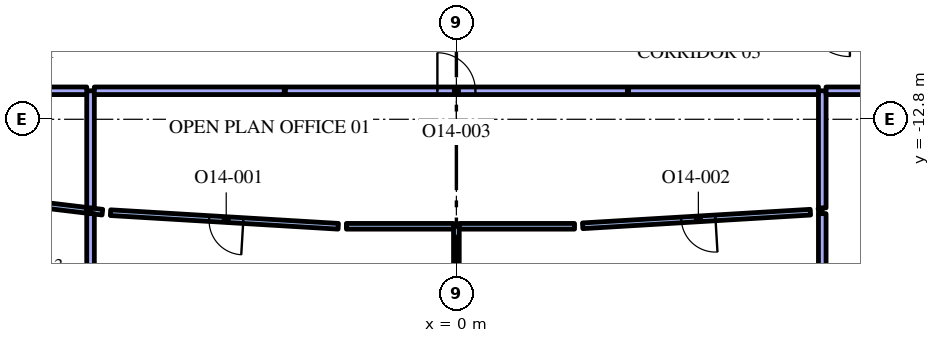
"""IFC4 building model, lengths in metres.
Left out: names, types, materials, properties, quantities, classifications, styles, units other than length and angle.
Written with IfcOpenShell. Run it as: python <this file> out.ifc"""

import sys

from ifc_helpers import new_model, si_unit, direction, frame, frame_2d, origin, place, context, subcontext, project, spatial, rectangle, extrude, element, fill, save


model = new_model("IFC4")
c1 = context("Model", 3, precision=1e-05, world=origin(), true_north=direction((0.0, 1.0)))
c2 = subcontext(c1, "Body", "Model", "MODEL_VIEW")
j1 = project(units=[si_unit("LENGTHUNIT", "METRE"), si_unit("PLANEANGLEUNIT", "RADIAN")], contexts=[c1])
p1 = place(None, origin())
s1 = spatial("IfcSite", under=j1, at=p1, CompositionType="ELEMENT")
p2 = place(p1, origin())
s2 = spatial("IfcBuilding", under=s1, at=p2, CompositionType="ELEMENT")
p3 = place(p2, frame((0.0, 0.0, 304.8)))
s3 = spatial("IfcBuildingStorey", under=s2, at=p3, CompositionType="ELEMENT", Elevation=304.8)
p4 = place(p3, frame((0.0, -15.615, 0.0), z_axis=(0.0, 0.0, 1.0), x_axis=(0.0, -1.0, 0.0)))
e1 = element("IfcWall", 1, at=p4, inside=s3, PredefinedType="PARTITIONING", context=c2, shape_type="SweptSolid", body=[
    extrude(rectangle(XDim=3.2, YDim=0.15, at=frame_2d((1.6, 0.0))), origin(), (0.0, 0.0, 1.0), 3.55),
])
p5 = place(p3, frame((-9.627, -15.207, 0.0), z_axis=(0.0, 0.0, 1.0), x_axis=(0.992909886905, -0.118869493503, 0.0)))
e2 = element("IfcWall", 2, at=p5, inside=s3, PredefinedType="PARTITIONING", context=c2, shape_type="SweptSolid", body=[
    extrude(rectangle(XDim=0.314, YDim=0.15, at=frame_2d((0.157, 0.0))), origin(), (0.0, 0.0, 1.0), 3.55),
])
p6 = place(p3, frame((-3.109, -15.615, 0.0), z_axis=(0.0, 0.0, 1.0), x_axis=(-0.998221243398, 0.059618363188, 0.0)))
e3 = element("IfcWall", 3, at=p6, inside=s3, PredefinedType="PARTITIONING", context=c2, shape_type="SweptSolid", body=[
    extrude(rectangle(XDim=6.003, YDim=0.15, at=frame_2d((3.002, 0.0))), origin(), (0.0, 0.0, 1.0), 3.55),
])
p7 = place(p6, frame((2.503, 0.0, 0.0)))
e4 = element("IfcOpeningElement", 4, at=p7, cuts=e3, PredefinedType="OPENING", context=c2, shape_type="SweptSolid", body=[
    extrude(rectangle(XDim=0.9, YDim=2.1, at=frame_2d((0.45, 1.05))), frame((0.0, 0.085, 0.0), z_axis=(0.0, -1.0, 0.0), x_axis=(1.0, 0.0, 0.0)), (0.0, 0.0, 1.0), 0.17),
])
p8 = place(p3, frame((-2.895, -15.615, 0.0), z_axis=(0.0, 0.0, 1.0), x_axis=(1.0, 0.0, 0.0)))
e5 = element("IfcWall", 5, at=p8, inside=s3, PredefinedType="PARTITIONING", context=c2, shape_type="SweptSolid", body=[
    extrude(rectangle(XDim=2.82, YDim=0.15, at=frame_2d((1.41, 0.0))), origin(), (0.0, 0.0, 1.0), 3.55),
])
p9 = place(p3, frame((-9.627, -17.919, 0.0), z_axis=(0.0, 0.0, 1.0), x_axis=(0.0, 1.0, 0.0)))
e6 = element("IfcWall", 6, at=p9, inside=s3, PredefinedType="PARTITIONING", context=c2, shape_type="SweptSolid", body=[
    extrude(rectangle(XDim=2.636, YDim=0.2, at=frame_2d((1.318, 0.0))), origin(), (0.0, 0.0, 1.0), 3.55),
])
p10 = place(p3, frame((0.075, -15.615, 0.0), z_axis=(0.0, 0.0, 1.0), x_axis=(1.0, 0.0, 0.0)))
e7 = element("IfcWall", 7, at=p10, inside=s3, PredefinedType="PARTITIONING", context=c2, shape_type="SweptSolid", body=[
    extrude(rectangle(XDim=3.034, YDim=0.15, at=frame_2d((1.517, 0.0))), origin(), (0.0, 0.0, 1.0), 3.55),
])
p11 = place(p3, frame((9.315, -15.244, 0.0), z_axis=(0.0, 0.0, 1.0), x_axis=(-0.998218822372, -0.059658885864, 0.0)))
e8 = element("IfcWall", 8, at=p11, inside=s3, PredefinedType="PARTITIONING", context=c2, shape_type="SweptSolid", body=[
    extrude(rectangle(XDim=6.003, YDim=0.15, at=frame_2d((3.002, 0.0))), origin(), (0.0, 0.0, 1.0), 3.55),
])
p12 = place(p11, frame((2.503, 0.0, 0.0)))
e9 = element("IfcOpeningElement", 9, at=p12, cuts=e8, PredefinedType="OPENING", context=c2, shape_type="SweptSolid", body=[
    extrude(rectangle(XDim=0.9, YDim=2.1, at=frame_2d((0.45, 1.05))), frame((0.0, 0.085, 0.0), z_axis=(0.0, -1.0, 0.0), x_axis=(1.0, 0.0, 0.0)), (0.0, 0.0, 1.0), 0.17),
])
p13 = place(p3, frame((9.528, -15.219, 0.0), z_axis=(0.0, 0.0, 1.0), x_axis=(0.992830592569, 0.119529973061, 0.0)))
e10 = element("IfcWall", 10, at=p13, inside=s3, PredefinedType="PARTITIONING", context=c2, shape_type="SweptSolid", body=[
    extrude(rectangle(XDim=0.1, YDim=0.15, at=frame_2d((0.05, 0.0))), origin(), (0.0, 0.0, 1.0), 3.55),
])
p14 = place(p3, frame((9.627, -15.283, 0.0), z_axis=(0.0, 0.0, 1.0), x_axis=(0.0, -1.0, 0.0)))
e11 = element("IfcWall", 11, at=p14, inside=s3, PredefinedType="PARTITIONING", context=c2, shape_type="SweptSolid", body=[
    extrude(rectangle(XDim=2.636, YDim=0.2, at=frame_2d((1.318, 0.0))), origin(), (0.0, 0.0, 1.0), 3.55),
])
for number, where, z_axis, x_axis in (
    (12, (9.627, -12.05, 0.0), (0.0, 0.0, 1.0), (0.0, -1.0, 0.0)),
    (13, (-9.627, -15.132, 0.0), (0.0, 0.0, 1.0), (0.0, 1.0, 0.0)),
):
    element("IfcWall", number, at=place(p3, frame(where, z_axis=z_axis, x_axis=x_axis)), inside=s3, PredefinedType="PARTITIONING", context=c2, shape_type="SweptSolid", body=[
        extrude(rectangle(XDim=3.082, YDim=0.2, at=frame_2d((1.541, 0.0))), origin(), (0.0, 0.0, 1.0), 3.55),
    ])
p15 = place(p3, frame((-4.5, -12.05, 0.0), z_axis=(0.0, 0.0, 1.0), x_axis=(1.0, 0.0, 0.0)))
e14 = element("IfcWall", 14, at=p15, inside=s3, PredefinedType="PARTITIONING", context=c2, shape_type="SweptSolid", body=[
    extrude(rectangle(XDim=9.0, YDim=0.2, at=frame_2d((4.5, 0.0))), origin(), (0.0, 0.0, 1.0), 3.55),
])
p16 = place(p15, frame((4.0, 0.0, 0.0)))
e15 = element("IfcOpeningElement", 15, at=p16, cuts=e14, PredefinedType="OPENING", context=c2, shape_type="SweptSolid", body=[
    extrude(rectangle(XDim=1.0, YDim=2.1, at=frame_2d((0.5, 1.05))), frame((0.0, 0.11, 0.0), z_axis=(0.0, -1.0, 0.0), x_axis=(1.0, 0.0, 0.0)), (0.0, 0.0, 1.0), 0.22),
])
for number, where, z_axis, x_axis in (
    (16, (-9.527, -12.05, 0.0), (0.0, 0.0, 1.0), (1.0, 0.0, 0.0)),
    (17, (4.53, -12.05, 0.0), (0.0, 0.0, 1.0), (1.0, 0.0, 0.0)),
):
    element("IfcWall", number, at=place(p3, frame(where, z_axis=z_axis, x_axis=x_axis)), inside=s3, PredefinedType="PARTITIONING", context=c2, shape_type="SweptSolid", body=[
        extrude(rectangle(XDim=4.997, YDim=0.2, at=frame_2d((2.499, 0.0))), origin(), (0.0, 0.0, 1.0), 3.55),
    ])
p17 = place(p3, frame((9.727, -12.05, 0.0), z_axis=(0.0, 0.0, 1.0), x_axis=(1.0, 0.0, 0.0)))
e18 = element("IfcWall", 18, at=p17, inside=s3, PredefinedType="PARTITIONING", context=c2, shape_type="SweptSolid", body=[
    extrude(rectangle(XDim=4.562, YDim=0.2, at=frame_2d((2.281, 0.0))), origin(), (0.0, 0.0, 1.0), 3.55),
])
p18 = place(p17, frame((1.8, 0.0, 0.0)))
e19 = element("IfcOpeningElement", 19, at=p18, cuts=e18, PredefinedType="OPENING", context=c2, shape_type="SweptSolid", body=[
    extrude(rectangle(XDim=1.0, YDim=2.1, at=frame_2d((0.5, 1.05))), frame((0.0, 0.11, 0.0), z_axis=(0.0, -1.0, 0.0), x_axis=(1.0, 0.0, 0.0)), (0.0, 0.0, 1.0), 0.22),
])
p19 = place(p3, frame((-9.727, -15.195, 0.0), z_axis=(0.0, 0.0, 1.0), x_axis=(-0.992892587246, 0.119013907556, 0.0)))
e20 = element("IfcWall", 20, at=p19, inside=s3, PredefinedType="PARTITIONING", context=c2, shape_type="SweptSolid", body=[
    extrude(rectangle(XDim=5.059, YDim=0.15, at=frame_2d((2.529, 0.0))), origin(), (0.0, 0.0, 1.0), 3.55),
])
p20 = place(p19, frame((2.059, 0.0, 0.0)))
e21 = element("IfcOpeningElement", 21, at=p20, cuts=e20, PredefinedType="OPENING", context=c2, shape_type="SweptSolid", body=[
    extrude(rectangle(XDim=0.9, YDim=2.1, at=frame_2d((0.45, 1.05))), frame((0.0, 0.085, 0.0), z_axis=(0.0, -1.0, 0.0), x_axis=(1.0, 0.0, 0.0)), (0.0, 0.0, 1.0), 0.17),
])
p21 = place(p3, frame((-14.26, -12.05, 0.0), z_axis=(0.0, 0.0, 1.0), x_axis=(1.0, 0.0, 0.0)))
e22 = element("IfcWall", 22, at=p21, inside=s3, PredefinedType="PARTITIONING", context=c2, shape_type="SweptSolid", body=[
    extrude(rectangle(XDim=4.532, YDim=0.2, at=frame_2d((2.266, 0.0))), origin(), (0.0, 0.0, 1.0), 3.55),
])
p22 = place(p7, origin())
e23 = element("IfcDoor", 23, at=p22, inside=s3, OperationType="SINGLE_SWING_LEFT", PredefinedType="DOOR", context=c2, shape_type="SweptSolid", body=[
    extrude(rectangle(XDim=0.9, YDim=2.1, at=frame_2d((0.45, 1.05))), frame((0.0, 0.025, 0.0), z_axis=(0.0, -1.0, 0.0), x_axis=(1.0, 0.0, 0.0)), (0.0, 0.0, 1.0), 0.05),
])
fill(e4, e23)
p23 = place(p12, origin())
e24 = element("IfcDoor", 24, at=p23, inside=s3, OperationType="SINGLE_SWING_LEFT", PredefinedType="DOOR", context=c2, shape_type="SweptSolid", body=[
    extrude(rectangle(XDim=0.9, YDim=2.1, at=frame_2d((0.45, 1.05))), frame((0.0, 0.025, 0.0), z_axis=(0.0, -1.0, 0.0), x_axis=(1.0, 0.0, 0.0)), (0.0, 0.0, 1.0), 0.05),
])
fill(e9, e24)
p24 = place(p16, origin())
e25 = element("IfcDoor", 25, at=p24, inside=s3, OperationType="SINGLE_SWING_RIGHT", PredefinedType="DOOR", context=c2, shape_type="SweptSolid", body=[
    extrude(rectangle(XDim=1.0, YDim=2.1, at=frame_2d((0.5, 1.05))), frame((0.0, 0.025, 0.0), z_axis=(0.0, -1.0, 0.0), x_axis=(1.0, 0.0, 0.0)), (0.0, 0.0, 1.0), 0.05),
])
fill(e15, e25)
save(model, sys.argv[1])
